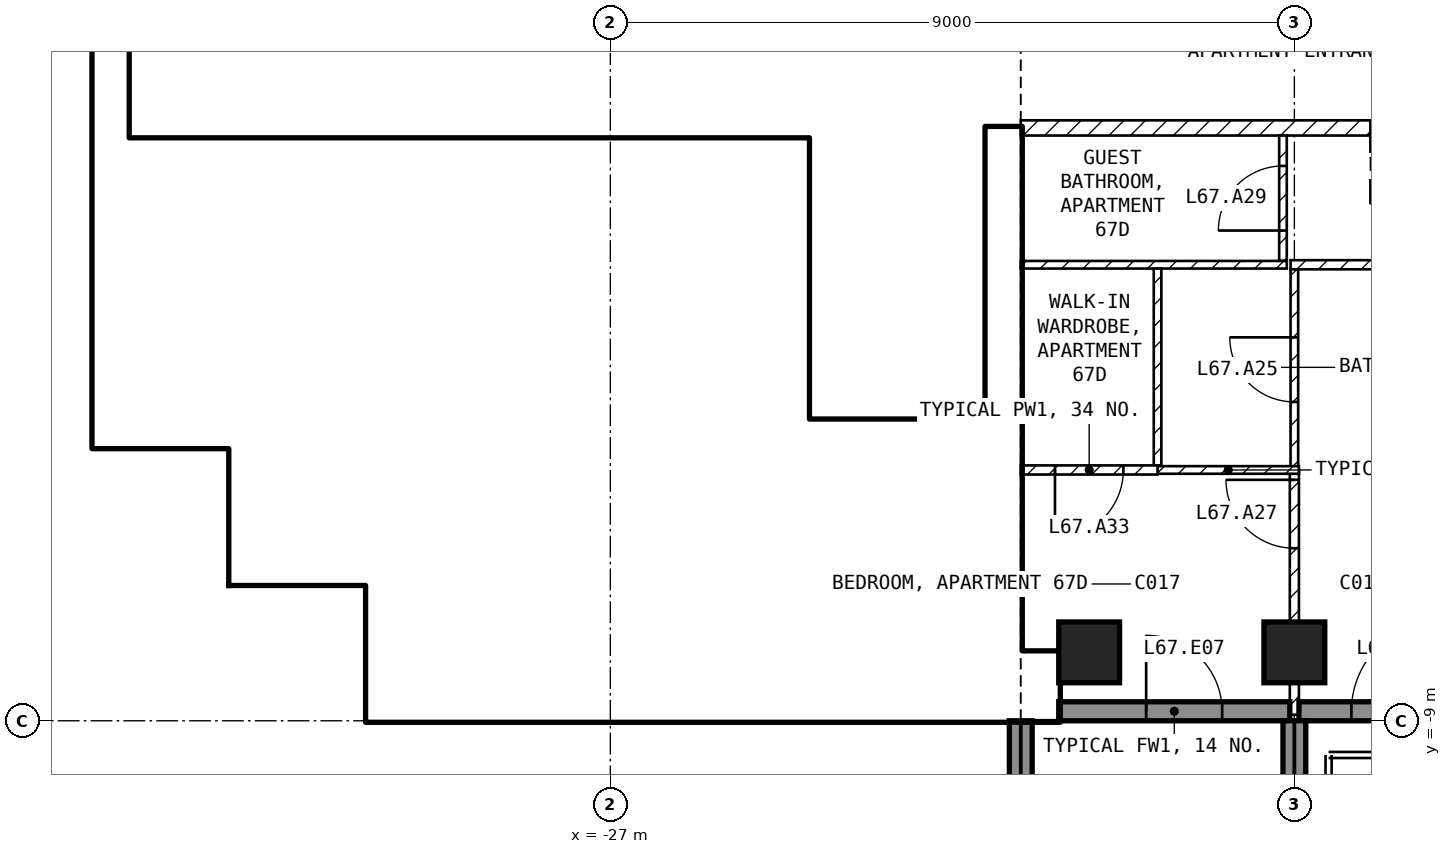
"""IFC4 building model, lengths in metres.
Left out: names, types, materials, properties, quantities, classifications, styles, units other than length and angle.
Written with IfcOpenShell. Run it as: python <this file> out.ifc"""

import sys

from ifc_helpers import new_model, si_unit, direction, frame, frame_2d, origin, origin_2d, place, context, subcontext, project, spatial, rectangle, extrude, element, fill, save


model = new_model("IFC4")
c1 = context("Model", 3, precision=1e-05, world=origin(), true_north=direction((0.0, 1.0)))
c2 = subcontext(c1, "Body", "Model", "MODEL_VIEW")
j1 = project(units=[si_unit("LENGTHUNIT", "METRE"), si_unit("PLANEANGLEUNIT", "RADIAN")], contexts=[c1])
p1 = place(None, origin())
s1 = spatial("IfcSite", under=j1, at=p1, CompositionType="ELEMENT")
p2 = place(p1, origin())
s2 = spatial("IfcBuilding", under=s1, at=p2, CompositionType="ELEMENT")
p3 = place(p2, frame((0.0, 0.0, 264.0)))
s3 = spatial("IfcBuildingStorey", under=s2, at=p3, CompositionType="ELEMENT", Elevation=264.0)
for number, where, z_axis, x_axis in (
    (1, (-20.7, -8.1, -0.25), (0.0, 0.0, 1.0), (1.0, 0.0, 0.0)),
    (2, (-18.0, -8.1, -0.25), (0.0, 0.0, 1.0), (1.0, 0.0, 0.0)),
):
    element("IfcColumn", number, at=place(p3, frame(where, z_axis=z_axis, x_axis=x_axis)), inside=s3, PredefinedType="COLUMN", context=c2, shape_type="SweptSolid", body=[
        extrude(rectangle(XDim=0.8, YDim=0.8, at=origin_2d()), origin(), (0.0, 0.0, 1.0), 3.5),
    ])
p4 = place(p3, frame((-21.1, -8.875, 0.0), z_axis=(0.0, 0.0, 1.0), x_axis=(1.0, 0.0, 0.0)))
e3 = element("IfcWall", 3, at=p4, inside=s3, PredefinedType="SOLIDWALL", context=c2, shape_type="SweptSolid", body=[
    extrude(rectangle(XDim=3.04, YDim=0.25, at=frame_2d((1.52, 0.0))), origin(), (0.0, 0.0, 1.0), 3.25),
])
p5 = place(p4, frame((1.15, 0.0, 0.0)))
e4 = element("IfcOpeningElement", 4, at=p5, cuts=e3, PredefinedType="OPENING", context=c2, shape_type="SweptSolid", body=[
    extrude(rectangle(XDim=1.0, YDim=2.4, at=frame_2d((0.5, 1.2))), frame((0.0, 0.135, 0.0), z_axis=(0.0, -1.0, 0.0), x_axis=(1.0, 0.0, 0.0)), (0.0, 0.0, 1.0), 0.27),
])
p6 = place(p3, frame((-17.94, -8.875, 0.0), z_axis=(0.0, 0.0, 1.0), x_axis=(1.0, 0.0, 0.0)))
e5 = element("IfcWall", 5, at=p6, inside=s3, PredefinedType="SOLIDWALL", context=c2, shape_type="SweptSolid", body=[
    extrude(rectangle(XDim=2.14, YDim=0.25, at=frame_2d((1.07, 0.0))), origin(), (0.0, 0.0, 1.0), 3.25),
])
p7 = place(p6, frame((0.69, 0.0, 0.0)))
e6 = element("IfcOpeningElement", 6, at=p7, cuts=e5, PredefinedType="OPENING", context=c2, shape_type="SweptSolid", body=[
    extrude(rectangle(XDim=1.2, YDim=2.4, at=frame_2d((0.6, 1.2))), frame((0.0, 0.135, 0.0), z_axis=(0.0, -1.0, 0.0), x_axis=(1.0, 0.0, 0.0)), (0.0, 0.0, 1.0), 0.27),
])
p8 = place(p3, frame((-21.6, -9.0, 0.0), z_axis=(0.0, 0.0, 1.0), x_axis=(0.0, -1.0, 0.0)))
e7 = element("IfcWall", 7, at=p8, inside=s3, PredefinedType="SOLIDWALL", context=c2, shape_type="SweptSolid", body=[
    extrude(rectangle(XDim=2.7, YDim=0.3, at=frame_2d((1.35, 0.0))), origin(), (0.0, 0.0, 1.0), 3.25),
])
p9 = place(p3, frame((-18.0, -9.0, 0.0), z_axis=(0.0, 0.0, 1.0), x_axis=(0.0, -1.0, 0.0)))
e8 = element("IfcWall", 8, at=p9, inside=s3, PredefinedType="SOLIDWALL", context=c2, shape_type="SweptSolid", body=[
    extrude(rectangle(XDim=2.74, YDim=0.3, at=frame_2d((1.37, 0.0))), origin(), (0.0, 0.0, 1.0), 3.25),
])
p10 = place(p3, frame((-30.2, -8.55, 0.0), z_axis=(0.0, 0.0, 1.0), x_axis=(1.0, 0.0, 0.0)))
e9 = element("IfcWall", 9, at=p10, inside=s3, PredefinedType="SHEAR", context=c2, shape_type="SweptSolid", body=[
    extrude(rectangle(XDim=9.1, YDim=0.9, at=frame_2d((4.55, 0.0))), origin(), (0.0, 0.0, 1.0), 3.25),
])
p11 = place(p3, frame((-29.975, -8.1, 0.0), z_axis=(0.0, 0.0, 1.0), x_axis=(0.0, 1.0, 0.0)))
e10 = element("IfcWall", 10, at=p11, inside=s3, PredefinedType="SHEAR", context=c2, shape_type="SweptSolid", body=[
    extrude(rectangle(XDim=1.35, YDim=0.45, at=frame_2d((0.675, 0.0))), origin(), (0.0, 0.0, 1.0), 3.25),
])
for number, where, z_axis, x_axis in (
    (11, (-32.0, -6.975, 0.0), (0.0, 0.0, 1.0), (1.0, 0.0, 0.0)),
    (12, (-31.775, -6.75, 0.0), (0.0, 0.0, 1.0), (0.0, 1.0, 0.0)),
    (13, (-33.8, -5.175, 0.0), (0.0, 0.0, 1.0), (1.0, 0.0, 0.0)),
):
    element("IfcWall", number, at=place(p3, frame(where, z_axis=z_axis, x_axis=x_axis)), inside=s3, PredefinedType="SHEAR", context=c2, shape_type="SweptSolid", body=[
        extrude(rectangle(XDim=1.8, YDim=0.45, at=frame_2d((0.9, 0.0))), origin(), (0.0, 0.0, 1.0), 3.25),
    ])
p12 = place(p3, frame((-33.575, -4.95, 0.0), z_axis=(0.0, 0.0, 1.0), x_axis=(0.0, 1.0, 0.0)))
e14 = element("IfcWall", 14, at=p12, inside=s3, PredefinedType="SHEAR", context=c2, shape_type="SweptSolid", body=[
    extrude(rectangle(XDim=10.35, YDim=0.45, at=frame_2d((5.175, 0.0))), origin(), (0.0, 0.0, 1.0), 3.25),
])
p13 = place(p3, frame((-21.825, -8.1, 0.0), z_axis=(0.0, 0.0, 1.0), x_axis=(0.0, 1.0, 0.0)))
e15 = element("IfcWall", 15, at=p13, inside=s3, PredefinedType="SHEAR", context=c2, shape_type="SweptSolid", body=[
    extrude(rectangle(XDim=6.9, YDim=0.45, at=frame_2d((3.45, 0.0))), origin(), (0.0, 0.0, 1.0), 3.25),
])
p14 = place(p3, frame((-24.5, -5.05, 0.0), z_axis=(0.0, 0.0, 1.0), x_axis=(0.0, 1.0, 0.0)))
e16 = element("IfcWall", 16, at=p14, inside=s3, PredefinedType="SOLIDWALL", context=c2, shape_type="SweptSolid", body=[
    extrude(rectangle(XDim=3.7, YDim=0.2, at=frame_2d((1.85, 0.0))), origin(), (0.0, 0.0, 1.0), 3.25),
])
p15 = place(p14, frame((0.1, 0.0, 0.0)))
e17 = element("IfcOpeningElement", 17, at=p15, cuts=e16, PredefinedType="OPENING", context=c2, shape_type="SweptSolid", body=[
    extrude(rectangle(XDim=0.8, YDim=2.1, at=frame_2d((0.4, 1.05))), frame((0.0, 0.11, 0.0), z_axis=(0.0, -1.0, 0.0), x_axis=(1.0, 0.0, 0.0)), (0.0, 0.0, 1.0), 0.22),
])
p16 = place(p3, frame((-28.35, -5.15, 0.0), z_axis=(0.0, 0.0, 1.0), x_axis=(1.0, 0.0, 0.0)))
e18 = element("IfcWall", 18, at=p16, inside=s3, PredefinedType="SOLIDWALL", context=c2, shape_type="SweptSolid", body=[
    extrude(rectangle(XDim=6.3, YDim=0.2, at=frame_2d((3.15, 0.0))), origin(), (0.0, 0.0, 1.0), 3.25),
])
p17 = place(p16, frame((5.1, 0.0, 0.0)))
e19 = element("IfcOpeningElement", 19, at=p17, cuts=e18, PredefinedType="OPENING", context=c2, shape_type="SweptSolid", body=[
    extrude(rectangle(XDim=1.0, YDim=2.1, at=frame_2d((0.5, 1.05))), frame((0.0, 0.11, 0.0), z_axis=(0.0, -1.0, 0.0), x_axis=(1.0, 0.0, 0.0)), (0.0, 0.0, 1.0), 0.22),
])
p18 = place(p3, frame((-28.25, -8.1, 0.0), z_axis=(0.0, 0.0, 1.0), x_axis=(0.0, 1.0, 0.0)))
e20 = element("IfcWall", 20, at=p18, inside=s3, PredefinedType="SOLIDWALL", context=c2, shape_type="SweptSolid", body=[
    extrude(rectangle(XDim=2.85, YDim=0.2, at=frame_2d((1.425, 0.0))), origin(), (0.0, 0.0, 1.0), 3.25),
])
p19 = place(p3, frame((-33.35, -1.45, 0.0), z_axis=(0.0, 0.0, 1.0), x_axis=(1.0, 0.0, 0.0)))
e21 = element("IfcWall", 21, at=p19, inside=s3, PredefinedType="SOLIDWALL", context=c2, shape_type="SweptSolid", body=[
    extrude(rectangle(XDim=8.75, YDim=0.2, at=frame_2d((4.375, 0.0))), origin(), (0.0, 0.0, 1.0), 3.25),
])
p20 = place(p19, frame((7.35, 0.0, 0.0)))
e22 = element("IfcOpeningElement", 22, at=p20, cuts=e21, PredefinedType="OPENING", context=c2, shape_type="SweptSolid", body=[
    extrude(rectangle(XDim=1.0, YDim=2.1, at=frame_2d((0.5, 1.05))), frame((0.0, 0.11, 0.0), z_axis=(0.0, -1.0, 0.0), x_axis=(1.0, 0.0, 0.0)), (0.0, 0.0, 1.0), 0.22),
])
p21 = place(p19, frame((5.35, 0.0, 0.0)))
e23 = element("IfcOpeningElement", 23, at=p21, cuts=e21, PredefinedType="OPENING", context=c2, shape_type="SweptSolid", body=[
    extrude(rectangle(XDim=1.0, YDim=2.1, at=frame_2d((0.5, 1.05))), frame((0.0, 0.11, 0.0), z_axis=(0.0, -1.0, 0.0), x_axis=(1.0, 0.0, 0.0)), (0.0, 0.0, 1.0), 0.22),
])
p22 = place(p19, frame((3.35, 0.0, 0.0)))
e24 = element("IfcOpeningElement", 24, at=p22, cuts=e21, PredefinedType="OPENING", context=c2, shape_type="SweptSolid", body=[
    extrude(rectangle(XDim=1.0, YDim=2.1, at=frame_2d((0.5, 1.05))), frame((0.0, 0.11, 0.0), z_axis=(0.0, -1.0, 0.0), x_axis=(1.0, 0.0, 0.0)), (0.0, 0.0, 1.0), 0.22),
])
p23 = place(p19, frame((0.925, 0.0, 0.0)))
e25 = element("IfcOpeningElement", 25, at=p23, cuts=e21, PredefinedType="OPENING", context=c2, shape_type="SweptSolid", body=[
    extrude(rectangle(XDim=0.9, YDim=2.1, at=frame_2d((0.45, 1.05))), frame((0.0, 0.11, 0.0), z_axis=(0.0, -1.0, 0.0), x_axis=(1.0, 0.0, 0.0)), (0.0, 0.0, 1.0), 0.22),
])
p24 = place(p3, frame((-33.35, -3.95, 0.0), z_axis=(0.0, 0.0, 1.0), x_axis=(1.0, 0.0, 0.0)))
e26 = element("IfcWall", 26, at=p24, inside=s3, PredefinedType="SOLIDWALL", context=c2, shape_type="SweptSolid", body=[
    extrude(rectangle(XDim=8.75, YDim=0.2, at=frame_2d((4.375, 0.0))), origin(), (0.0, 0.0, 1.0), 3.25),
])
for number, where, z_axis, x_axis in (
    (27, (-26.5, -3.85, 0.0), (0.0, 0.0, 1.0), (0.0, 1.0, 0.0)),
    (28, (-28.5, -3.85, 0.0), (0.0, 0.0, 1.0), (0.0, 1.0, 0.0)),
    (29, (-30.5, -3.85, 0.0), (0.0, 0.0, 1.0), (0.0, 1.0, 0.0)),
):
    element("IfcWall", number, at=place(p3, frame(where, z_axis=z_axis, x_axis=x_axis)), inside=s3, PredefinedType="SOLIDWALL", context=c2, shape_type="SweptSolid", body=[
        extrude(rectangle(XDim=2.3, YDim=0.2, at=frame_2d((1.15, 0.0))), origin(), (0.0, 0.0, 1.0), 3.25),
    ])
p25 = place(p3, frame((-27.4, -5.05, 0.0), z_axis=(0.0, 0.0, 1.0), x_axis=(0.0, 1.0, 0.0)))
e30 = element("IfcWall", 30, at=p25, inside=s3, PredefinedType="PARTITIONING", context=c2, shape_type="SweptSolid", body=[
    extrude(rectangle(XDim=1.0, YDim=0.15, at=frame_2d((0.5, 0.0))), origin(), (0.0, 0.0, 1.0), 3.25),
])
p26 = place(p25, frame((0.1, 0.0, 0.0)))
e31 = element("IfcOpeningElement", 31, at=p26, cuts=e30, PredefinedType="OPENING", context=c2, shape_type="SweptSolid", body=[
    extrude(rectangle(XDim=0.8, YDim=2.1, at=frame_2d((0.4, 1.05))), frame((0.0, 0.085, 0.0), z_axis=(0.0, -1.0, 0.0), x_axis=(1.0, 0.0, 0.0)), (0.0, 0.0, 1.0), 0.17),
])
p27 = place(p3, frame((-4.4, -1.2, 0.0), z_axis=(0.0, 0.0, 1.0), x_axis=(-1.0, 0.0, 0.0)))
e32 = element("IfcWall", 32, at=p27, inside=s3, PredefinedType="PARTITIONING", context=c2, shape_type="SweptSolid", body=[
    extrude(rectangle(XDim=17.2, YDim=0.2, at=frame_2d((8.6, 0.0))), origin(), (0.0, 0.0, 1.0), 3.25),
])
p28 = place(p27, frame((11.6, 0.0, 0.0)))
e33 = element("IfcOpeningElement", 33, at=p28, cuts=e32, PredefinedType="OPENING", context=c2, shape_type="SweptSolid", body=[
    extrude(rectangle(XDim=1.0, YDim=2.1, at=frame_2d((0.5, 1.05))), frame((0.0, 0.11, 0.0), z_axis=(0.0, -1.0, 0.0), x_axis=(1.0, 0.0, 0.0)), (0.0, 0.0, 1.0), 0.22),
])
p29 = place(p3, frame((-11.85, -3.0, 0.0), z_axis=(0.0, 0.0, 1.0), x_axis=(-1.0, 0.0, 0.0)))
e34 = element("IfcWall", 34, at=p29, inside=s3, PredefinedType="PARTITIONING", context=c2, shape_type="SweptSolid", body=[
    extrude(rectangle(XDim=6.2, YDim=0.12, at=frame_2d((3.1, 0.0))), origin(), (0.0, 0.0, 1.0), 3.25),
])
p30 = place(p29, frame((4.125, 0.0, 0.0)))
e35 = element("IfcOpeningElement", 35, at=p30, cuts=e34, PredefinedType="OPENING", context=c2, shape_type="SweptSolid", body=[
    extrude(rectangle(XDim=0.9, YDim=2.1, at=frame_2d((0.45, 1.05))), frame((0.0, 0.07, 0.0), z_axis=(0.0, -1.0, 0.0), x_axis=(1.0, 0.0, 0.0)), (0.0, 0.0, 1.0), 0.14),
])
p31 = place(p3, frame((-18.15, -2.95, 0.0), z_axis=(0.0, 0.0, 1.0), x_axis=(0.0, 1.0, 0.0)))
e36 = element("IfcWall", 36, at=p31, inside=s3, PredefinedType="PARTITIONING", context=c2, shape_type="SweptSolid", body=[
    extrude(rectangle(XDim=1.65, YDim=0.1, at=frame_2d((0.825, 0.0))), origin(), (0.0, 0.0, 1.0), 2.496),
])
p32 = place(p31, frame((0.4, 0.0, 0.0)))
e37 = element("IfcOpeningElement", 37, at=p32, cuts=e36, PredefinedType="OPENING", context=c2, shape_type="SweptSolid", body=[
    extrude(rectangle(XDim=0.85, YDim=2.1, at=frame_2d((0.425, 1.05))), frame((0.0, 0.06, 0.0), z_axis=(0.0, -1.0, 0.0), x_axis=(1.0, 0.0, 0.0)), (0.0, 0.0, 1.0), 0.12),
])
p33 = place(p3, frame((-18.1, -3.0, 0.0), z_axis=(0.0, 0.0, 1.0), x_axis=(-1.0, 0.0, 0.0)))
e38 = element("IfcWall", 38, at=p33, inside=s3, PredefinedType="PARTITIONING", context=c2, shape_type="SweptSolid", body=[
    extrude(rectangle(XDim=3.5, YDim=0.1, at=frame_2d((1.75, 0.0))), origin(), (0.0, 0.0, 1.0), 3.25),
])
p34 = place(p3, frame((-18.0, -5.7, 0.0), z_axis=(0.0, 0.0, 1.0), x_axis=(0.0, 1.0, 0.0)))
e39 = element("IfcWall", 39, at=p34, inside=s3, PredefinedType="PARTITIONING", context=c2, shape_type="SweptSolid", body=[
    extrude(rectangle(XDim=2.64, YDim=0.1, at=frame_2d((1.32, 0.0))), origin(), (0.0, 0.0, 1.0), 2.496),
])
p35 = place(p34, frame((0.895, 0.0, 0.0)))
e40 = element("IfcOpeningElement", 40, at=p35, cuts=e39, PredefinedType="OPENING", context=c2, shape_type="SweptSolid", body=[
    extrude(rectangle(XDim=0.85, YDim=2.1, at=frame_2d((0.425, 1.05))), frame((0.0, 0.06, 0.0), z_axis=(0.0, -1.0, 0.0), x_axis=(1.0, 0.0, 0.0)), (0.0, 0.0, 1.0), 0.12),
])
p36 = place(p3, frame((-18.0, -8.92, 0.0), z_axis=(0.0, 0.0, 1.0), x_axis=(0.0, 1.0, 0.0)))
e41 = element("IfcWall", 41, at=p36, inside=s3, PredefinedType="PARTITIONING", context=c2, shape_type="SweptSolid", body=[
    extrude(rectangle(XDim=3.22, YDim=0.12, at=frame_2d((1.61, 0.0))), origin(), (0.0, 0.0, 1.0), 2.496),
])
p37 = place(p36, frame((2.19, 0.0, 0.0)))
e42 = element("IfcOpeningElement", 42, at=p37, cuts=e41, PredefinedType="OPENING", context=c2, shape_type="SweptSolid", body=[
    extrude(rectangle(XDim=0.9, YDim=2.1, at=frame_2d((0.45, 1.05))), frame((0.0, 0.07, 0.0), z_axis=(0.0, -1.0, 0.0), x_axis=(1.0, 0.0, 0.0)), (0.0, 0.0, 1.0), 0.14),
])
p38 = place(p3, frame((-19.8, -5.64, 0.0), z_axis=(0.0, 0.0, 1.0), x_axis=(0.0, 1.0, 0.0)))
e43 = element("IfcWall", 43, at=p38, inside=s3, PredefinedType="PARTITIONING", context=c2, shape_type="SweptSolid", body=[
    extrude(rectangle(XDim=2.59, YDim=0.1, at=frame_2d((1.295, 0.0))), origin(), (0.0, 0.0, 1.0), 3.25),
])
p39 = place(p3, frame((-17.94, -5.7, 0.0), z_axis=(0.0, 0.0, 1.0), x_axis=(-1.0, 0.0, 0.0)))
e44 = element("IfcWall", 44, at=p39, inside=s3, PredefinedType="PARTITIONING", context=c2, shape_type="SweptSolid", body=[
    extrude(rectangle(XDim=1.86, YDim=0.1, at=frame_2d((0.93, 0.0))), origin(), (0.0, 0.0, 1.0), 3.25),
])
p40 = place(p3, frame((-19.8, -5.7, 0.0), z_axis=(0.0, 0.0, 1.0), x_axis=(-1.0, 0.0, 0.0)))
e45 = element("IfcWall", 45, at=p40, inside=s3, PredefinedType="PARTITIONING", context=c2, shape_type="SweptSolid", body=[
    extrude(rectangle(XDim=1.8, YDim=0.12, at=frame_2d((0.9, 0.0))), origin(), (0.0, 0.0, 1.0), 3.25),
])
p41 = place(p40, frame((0.45, 0.0, 0.0)))
e46 = element("IfcOpeningElement", 46, at=p41, cuts=e45, PredefinedType="OPENING", context=c2, shape_type="SweptSolid", body=[
    extrude(rectangle(XDim=0.9, YDim=2.1, at=frame_2d((0.45, 1.05))), frame((0.0, 0.07, 0.0), z_axis=(0.0, -1.0, 0.0), x_axis=(1.0, 0.0, 0.0)), (0.0, 0.0, 1.0), 0.14),
])
p42 = place(p5, origin())
e47 = element("IfcDoor", 47, at=p42, inside=s3, OperationType="SINGLE_SWING_LEFT", PredefinedType="DOOR", context=c2, shape_type="SweptSolid", body=[
    extrude(rectangle(XDim=1.0, YDim=2.4, at=frame_2d((0.5, 1.2))), frame((0.0, 0.025, 0.0), z_axis=(0.0, -1.0, 0.0), x_axis=(1.0, 0.0, 0.0)), (0.0, 0.0, 1.0), 0.05),
])
fill(e4, e47)
p43 = place(p7, origin())
e48 = element("IfcDoor", 48, at=p43, inside=s3, OperationType="SINGLE_SWING_RIGHT", PredefinedType="DOOR", context=c2, shape_type="SweptSolid", body=[
    extrude(rectangle(XDim=1.2, YDim=2.4, at=frame_2d((0.6, 1.2))), frame((0.0, 0.025, 0.0), z_axis=(0.0, -1.0, 0.0), x_axis=(1.0, 0.0, 0.0)), (0.0, 0.0, 1.0), 0.05),
])
fill(e6, e48)
p44 = place(p20, origin())
e49 = element("IfcDoor", 49, at=p44, inside=s3, OperationType="DOUBLE_DOOR_SLIDING", PredefinedType="DOOR", context=c2, shape_type="SweptSolid", body=[
    extrude(rectangle(XDim=1.0, YDim=2.1, at=frame_2d((0.5, 1.05))), frame((0.0, 0.025, 0.0), z_axis=(0.0, -1.0, 0.0), x_axis=(1.0, 0.0, 0.0)), (0.0, 0.0, 1.0), 0.05),
])
fill(e22, e49)
p45 = place(p21, origin())
e50 = element("IfcDoor", 50, at=p45, inside=s3, OperationType="DOUBLE_DOOR_SLIDING", PredefinedType="DOOR", context=c2, shape_type="SweptSolid", body=[
    extrude(rectangle(XDim=1.0, YDim=2.1, at=frame_2d((0.5, 1.05))), frame((0.0, 0.025, 0.0), z_axis=(0.0, -1.0, 0.0), x_axis=(1.0, 0.0, 0.0)), (0.0, 0.0, 1.0), 0.05),
])
fill(e23, e50)
p46 = place(p22, origin())
e51 = element("IfcDoor", 51, at=p46, inside=s3, OperationType="DOUBLE_DOOR_SLIDING", PredefinedType="DOOR", context=c2, shape_type="SweptSolid", body=[
    extrude(rectangle(XDim=1.0, YDim=2.1, at=frame_2d((0.5, 1.05))), frame((0.0, 0.025, 0.0), z_axis=(0.0, -1.0, 0.0), x_axis=(1.0, 0.0, 0.0)), (0.0, 0.0, 1.0), 0.05),
])
fill(e24, e51)
p47 = place(p17, origin())
e52 = element("IfcDoor", 52, at=p47, inside=s3, OperationType="SINGLE_SWING_LEFT", PredefinedType="DOOR", context=c2, shape_type="SweptSolid", body=[
    extrude(rectangle(XDim=1.0, YDim=2.1, at=frame_2d((0.5, 1.05))), frame((0.0, 0.025, 0.0), z_axis=(0.0, -1.0, 0.0), x_axis=(1.0, 0.0, 0.0)), (0.0, 0.0, 1.0), 0.05),
])
fill(e19, e52)
p48 = place(p15, origin())
e53 = element("IfcDoor", 53, at=p48, inside=s3, OperationType="SINGLE_SWING_LEFT", PredefinedType="DOOR", context=c2, shape_type="SweptSolid", body=[
    extrude(rectangle(XDim=0.8, YDim=2.1, at=frame_2d((0.4, 1.05))), frame((0.0, 0.025, 0.0), z_axis=(0.0, -1.0, 0.0), x_axis=(1.0, 0.0, 0.0)), (0.0, 0.0, 1.0), 0.05),
])
fill(e17, e53)
p49 = place(p26, origin())
e54 = element("IfcDoor", 54, at=p49, inside=s3, OperationType="SINGLE_SWING_LEFT", PredefinedType="DOOR", context=c2, shape_type="SweptSolid", body=[
    extrude(rectangle(XDim=0.8, YDim=2.1, at=frame_2d((0.4, 1.05))), frame((0.0, 0.025, 0.0), z_axis=(0.0, -1.0, 0.0), x_axis=(1.0, 0.0, 0.0)), (0.0, 0.0, 1.0), 0.05),
])
fill(e31, e54)
p50 = place(p23, origin())
e55 = element("IfcDoor", 55, at=p50, inside=s3, OperationType="SINGLE_SWING_LEFT", PredefinedType="DOOR", context=c2, shape_type="SweptSolid", body=[
    extrude(rectangle(XDim=0.9, YDim=2.1, at=frame_2d((0.45, 1.05))), frame((0.0, 0.025, 0.0), z_axis=(0.0, -1.0, 0.0), x_axis=(1.0, 0.0, 0.0)), (0.0, 0.0, 1.0), 0.05),
])
fill(e25, e55)
p51 = place(p35, origin())
e56 = element("IfcDoor", 56, at=p51, inside=s3, OperationType="SINGLE_SWING_RIGHT", PredefinedType="DOOR", context=c2, shape_type="SweptSolid", body=[
    extrude(rectangle(XDim=0.85, YDim=2.1, at=frame_2d((0.425, 1.05))), frame((0.0, 0.025, 0.0), z_axis=(0.0, -1.0, 0.0), x_axis=(1.0, 0.0, 0.0)), (0.0, 0.0, 1.0), 0.05),
])
fill(e40, e56)
p52 = place(p37, origin())
e57 = element("IfcDoor", 57, at=p52, inside=s3, OperationType="SINGLE_SWING_RIGHT", PredefinedType="DOOR", context=c2, shape_type="SweptSolid", body=[
    extrude(rectangle(XDim=0.9, YDim=2.1, at=frame_2d((0.45, 1.05))), frame((0.0, 0.025, 0.0), z_axis=(0.0, -1.0, 0.0), x_axis=(1.0, 0.0, 0.0)), (0.0, 0.0, 1.0), 0.05),
])
fill(e42, e57)
p53 = place(p32, origin())
e58 = element("IfcDoor", 58, at=p53, inside=s3, OperationType="SINGLE_SWING_LEFT", PredefinedType="DOOR", context=c2, shape_type="SweptSolid", body=[
    extrude(rectangle(XDim=0.85, YDim=2.1, at=frame_2d((0.425, 1.05))), frame((0.0, 0.025, 0.0), z_axis=(0.0, -1.0, 0.0), x_axis=(1.0, 0.0, 0.0)), (0.0, 0.0, 1.0), 0.05),
])
fill(e37, e58)
p54 = place(p41, origin())
e59 = element("IfcDoor", 59, at=p54, inside=s3, OperationType="SINGLE_SWING_RIGHT", PredefinedType="DOOR", context=c2, shape_type="SweptSolid", body=[
    extrude(rectangle(XDim=0.9, YDim=2.1, at=frame_2d((0.45, 1.05))), frame((0.0, 0.025, 0.0), z_axis=(0.0, -1.0, 0.0), x_axis=(1.0, 0.0, 0.0)), (0.0, 0.0, 1.0), 0.05),
])
fill(e46, e59)
save(model, sys.argv[1])
